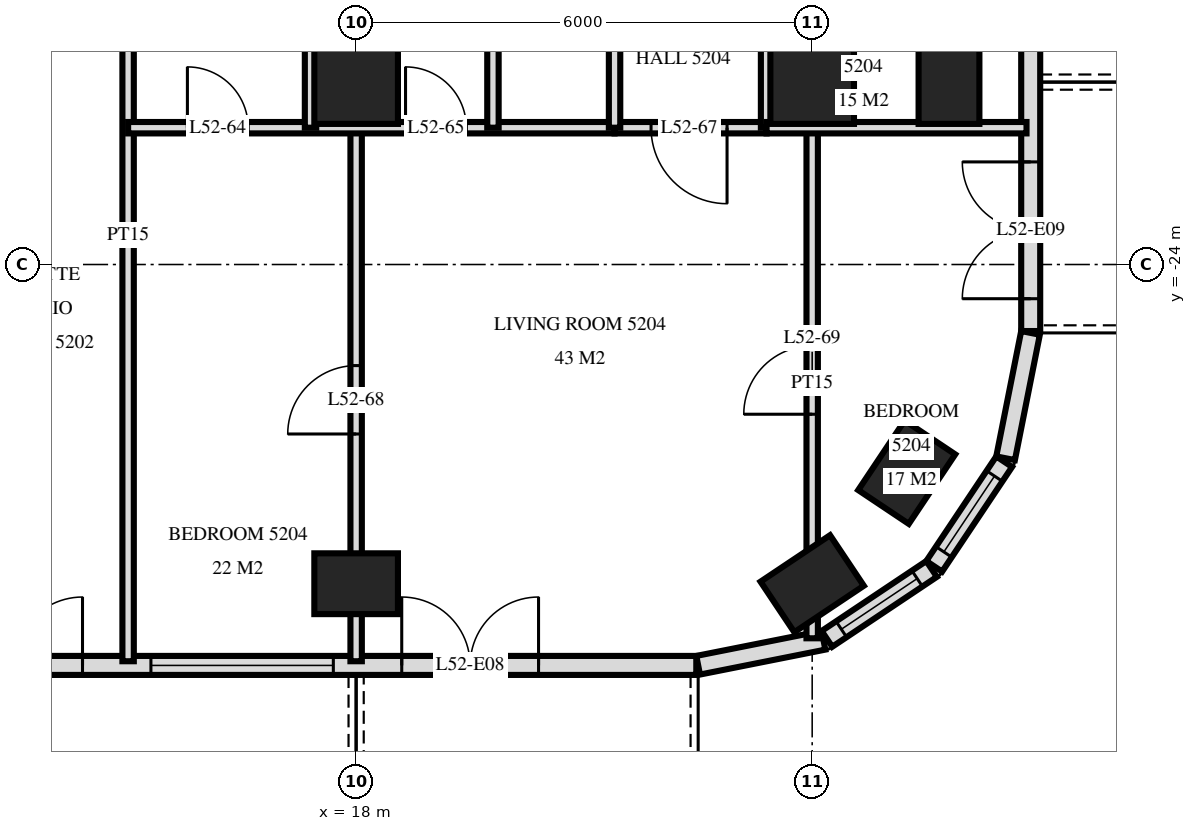
"""IFC4 building model, lengths in metres.
Left out: names, types, materials, properties, quantities, classifications, styles, units other than length and angle.
Written with IfcOpenShell. Run it as: python <this file> out.ifc"""

import sys

from ifc_helpers import new_model, si_unit, direction, frame, frame_2d, origin, origin_2d, place, context, subcontext, project, spatial, rectangle, extrude, element, fill, save


model = new_model("IFC4")
c1 = context("Model", 3, precision=1e-05, world=origin(), true_north=direction((0.0, 1.0)))
c2 = subcontext(c1, "Body", "Model", "MODEL_VIEW")
j1 = project(units=[si_unit("LENGTHUNIT", "METRE"), si_unit("PLANEANGLEUNIT", "RADIAN")], contexts=[c1])
p1 = place(None, origin())
s1 = spatial("IfcSite", under=j1, at=p1, CompositionType="ELEMENT")
p2 = place(p1, origin())
s2 = spatial("IfcBuilding", under=s1, at=p2, CompositionType="ELEMENT")
p3 = place(p2, frame((0.0, 0.0, 201.1)))
s3 = spatial("IfcBuildingStorey", under=s2, at=p3, CompositionType="ELEMENT", Elevation=201.1)
p4 = place(p3, frame((18.0, -28.2, 0.0), z_axis=(0.0, 0.0, 1.0), x_axis=(1.0, 0.0, 0.0)))
e1 = element("IfcColumn", 1, at=p4, inside=s3, PredefinedType="COLUMN", context=c2, shape_type="SweptSolid", body=[
    extrude(rectangle(XDim=1.1, YDim=0.8, at=origin_2d()), origin(), (0.0, 0.0, 1.0), 3.5),
])
p5 = place(p3, frame((18.0, -21.6, 0.0), z_axis=(0.0, 0.0, 1.0), x_axis=(1.0, 0.0, 0.0)))
e2 = element("IfcColumn", 2, at=p5, inside=s3, PredefinedType="COLUMN", context=c2, shape_type="SweptSolid", body=[
    extrude(rectangle(XDim=1.1, YDim=1.1, at=origin_2d()), origin(), (0.0, 0.0, 1.0), 3.5),
])
p6 = place(p3, frame((24.0, -28.2, 0.0), z_axis=(0.0, 0.0, 1.0), x_axis=(0.831459915646, 0.555584744817, 0.0)))
e3 = element("IfcColumn", 3, at=p6, inside=s3, PredefinedType="COLUMN", context=c2, shape_type="SweptSolid", body=[
    extrude(rectangle(XDim=1.1, YDim=0.8, at=origin_2d()), origin(), (0.0, 0.0, 1.0), 3.5),
])
p7 = place(p3, frame((24.0, -21.6, 0.0), z_axis=(0.0, 0.0, 1.0), x_axis=(1.0, 0.0, 0.0)))
e4 = element("IfcColumn", 4, at=p7, inside=s3, PredefinedType="COLUMN", context=c2, shape_type="SweptSolid", body=[
    extrude(rectangle(XDim=1.1, YDim=1.1, at=origin_2d()), origin(), (0.0, 0.0, 1.0), 3.5),
])
for number, where, z_axis, x_axis in (
    (5, (25.244, -26.733, 0.0), (0.0, 0.0, 1.0), (0.556, 0.831, 0.0)),
    (6, (25.8, -21.6, 0.0), (0.0, 0.0, 1.0), (0.0, 1.0, 0.0)),
):
    element("IfcColumn", number, at=place(p3, frame(where, z_axis=z_axis, x_axis=x_axis)), inside=s3, PredefinedType="COLUMN", context=c2, shape_type="SweptSolid", body=[
        extrude(rectangle(XDim=1.1, YDim=0.8, at=origin_2d()), origin(), (0.0, 0.0, 1.0), 3.5),
    ])
p8 = place(p3, frame((-22.475, -29.275, 0.0), z_axis=(0.0, 0.0, 1.0), x_axis=(1.0, 0.0, 0.0)))
e7 = element("IfcWall", 7, at=p8, inside=s3, PredefinedType="SOLIDWALL", context=c2, shape_type="SweptSolid", body=[
    extrude(rectangle(XDim=44.951, YDim=0.25, at=frame_2d((22.475, 0.0))), origin(), (0.0, 0.0, 1.0), 3.22),
])
p9 = place(p8, frame((0.575, 0.0, 0.0)))
e8 = element("IfcOpeningElement", 8, at=p9, cuts=e7, PredefinedType="OPENING", context=c2, shape_type="SweptSolid", body=[
    extrude(rectangle(XDim=1.8, YDim=2.4, at=frame_2d((0.9, 1.2))), frame((0.0, 0.135, 0.0), z_axis=(0.0, -1.0, 0.0), x_axis=(1.0, 0.0, 0.0)), (0.0, 0.0, 1.0), 0.27),
])
p10 = place(p8, frame((4.775, 0.0, 0.9)))
e9 = element("IfcOpeningElement", 9, at=p10, cuts=e7, PredefinedType="OPENING", context=c2, shape_type="SweptSolid", body=[
    extrude(rectangle(XDim=2.4, YDim=1.5, at=frame_2d((1.2, 0.75))), frame((0.0, 0.135, 0.0), z_axis=(0.0, -1.0, 0.0), x_axis=(1.0, 0.0, 0.0)), (0.0, 0.0, 1.0), 0.27),
])
p11 = place(p8, frame((8.075, 0.0, 0.0)))
e10 = element("IfcOpeningElement", 10, at=p11, cuts=e7, PredefinedType="OPENING", context=c2, shape_type="SweptSolid", body=[
    extrude(rectangle(XDim=1.8, YDim=2.4, at=frame_2d((0.9, 1.2))), frame((0.0, 0.135, 0.0), z_axis=(0.0, -1.0, 0.0), x_axis=(1.0, 0.0, 0.0)), (0.0, 0.0, 1.0), 0.27),
])
p12 = place(p8, frame((11.075, 0.0, 0.0)))
e11 = element("IfcOpeningElement", 11, at=p12, cuts=e7, PredefinedType="OPENING", context=c2, shape_type="SweptSolid", body=[
    extrude(rectangle(XDim=1.8, YDim=2.4, at=frame_2d((0.9, 1.2))), frame((0.0, 0.135, 0.0), z_axis=(0.0, -1.0, 0.0), x_axis=(1.0, 0.0, 0.0)), (0.0, 0.0, 1.0), 0.27),
])
p13 = place(p8, frame((13.775, 0.0, 0.9)))
e12 = element("IfcOpeningElement", 12, at=p13, cuts=e7, PredefinedType="OPENING", context=c2, shape_type="SweptSolid", body=[
    extrude(rectangle(XDim=2.4, YDim=1.5, at=frame_2d((1.2, 0.75))), frame((0.0, 0.135, 0.0), z_axis=(0.0, -1.0, 0.0), x_axis=(1.0, 0.0, 0.0)), (0.0, 0.0, 1.0), 0.27),
])
p14 = place(p8, frame((16.775, 0.0, 0.9)))
e13 = element("IfcOpeningElement", 13, at=p14, cuts=e7, PredefinedType="OPENING", context=c2, shape_type="SweptSolid", body=[
    extrude(rectangle(XDim=2.4, YDim=1.5, at=frame_2d((1.2, 0.75))), frame((0.0, 0.135, 0.0), z_axis=(0.0, -1.0, 0.0), x_axis=(1.0, 0.0, 0.0)), (0.0, 0.0, 1.0), 0.27),
])
p15 = place(p8, frame((20.075, 0.0, 0.0)))
e14 = element("IfcOpeningElement", 14, at=p15, cuts=e7, PredefinedType="OPENING", context=c2, shape_type="SweptSolid", body=[
    extrude(rectangle(XDim=1.8, YDim=2.4, at=frame_2d((0.9, 1.2))), frame((0.0, 0.135, 0.0), z_axis=(0.0, -1.0, 0.0), x_axis=(1.0, 0.0, 0.0)), (0.0, 0.0, 1.0), 0.27),
])
p16 = place(p8, frame((23.075, 0.0, 0.0)))
e15 = element("IfcOpeningElement", 15, at=p16, cuts=e7, PredefinedType="OPENING", context=c2, shape_type="SweptSolid", body=[
    extrude(rectangle(XDim=1.8, YDim=2.4, at=frame_2d((0.9, 1.2))), frame((0.0, 0.135, 0.0), z_axis=(0.0, -1.0, 0.0), x_axis=(1.0, 0.0, 0.0)), (0.0, 0.0, 1.0), 0.27),
])
p17 = place(p8, frame((25.775, 0.0, 0.9)))
e16 = element("IfcOpeningElement", 16, at=p17, cuts=e7, PredefinedType="OPENING", context=c2, shape_type="SweptSolid", body=[
    extrude(rectangle(XDim=2.4, YDim=1.5, at=frame_2d((1.2, 0.75))), frame((0.0, 0.135, 0.0), z_axis=(0.0, -1.0, 0.0), x_axis=(1.0, 0.0, 0.0)), (0.0, 0.0, 1.0), 0.27),
])
p18 = place(p8, frame((29.075, 0.0, 0.0)))
e17 = element("IfcOpeningElement", 17, at=p18, cuts=e7, PredefinedType="OPENING", context=c2, shape_type="SweptSolid", body=[
    extrude(rectangle(XDim=1.8, YDim=2.4, at=frame_2d((0.9, 1.2))), frame((0.0, 0.135, 0.0), z_axis=(0.0, -1.0, 0.0), x_axis=(1.0, 0.0, 0.0)), (0.0, 0.0, 1.0), 0.27),
])
p19 = place(p8, frame((31.775, 0.0, 0.9)))
e18 = element("IfcOpeningElement", 18, at=p19, cuts=e7, PredefinedType="OPENING", context=c2, shape_type="SweptSolid", body=[
    extrude(rectangle(XDim=2.4, YDim=1.5, at=frame_2d((1.2, 0.75))), frame((0.0, 0.135, 0.0), z_axis=(0.0, -1.0, 0.0), x_axis=(1.0, 0.0, 0.0)), (0.0, 0.0, 1.0), 0.27),
])
p20 = place(p8, frame((35.075, 0.0, 0.0)))
e19 = element("IfcOpeningElement", 19, at=p20, cuts=e7, PredefinedType="OPENING", context=c2, shape_type="SweptSolid", body=[
    extrude(rectangle(XDim=1.8, YDim=2.4, at=frame_2d((0.9, 1.2))), frame((0.0, 0.135, 0.0), z_axis=(0.0, -1.0, 0.0), x_axis=(1.0, 0.0, 0.0)), (0.0, 0.0, 1.0), 0.27),
])
p21 = place(p8, frame((37.775, 0.0, 0.9)))
e20 = element("IfcOpeningElement", 20, at=p21, cuts=e7, PredefinedType="OPENING", context=c2, shape_type="SweptSolid", body=[
    extrude(rectangle(XDim=2.4, YDim=1.5, at=frame_2d((1.2, 0.75))), frame((0.0, 0.135, 0.0), z_axis=(0.0, -1.0, 0.0), x_axis=(1.0, 0.0, 0.0)), (0.0, 0.0, 1.0), 0.27),
])
p22 = place(p8, frame((41.075, 0.0, 0.0)))
e21 = element("IfcOpeningElement", 21, at=p22, cuts=e7, PredefinedType="OPENING", context=c2, shape_type="SweptSolid", body=[
    extrude(rectangle(XDim=1.8, YDim=2.4, at=frame_2d((0.9, 1.2))), frame((0.0, 0.135, 0.0), z_axis=(0.0, -1.0, 0.0), x_axis=(1.0, 0.0, 0.0)), (0.0, 0.0, 1.0), 0.27),
])
p23 = place(p3, frame((22.5, -29.273, 0.0), z_axis=(0.0, 0.0, 1.0), x_axis=(0.980775640221, 0.19513878023, 0.0)))
e22 = element("IfcWall", 22, at=p23, inside=s3, PredefinedType="SOLIDWALL", context=c2, shape_type="SweptSolid", body=[
    extrude(rectangle(XDim=1.681, YDim=0.25, at=frame_2d((0.841, 0.0))), origin(), (0.0, 0.0, 1.0), 3.22),
])
p24 = place(p3, frame((24.194, -28.926, 0.0), z_axis=(0.0, 0.0, 1.0), x_axis=(0.831482937015, 0.55555029066, 0.0)))
e23 = element("IfcWall", 23, at=p24, inside=s3, PredefinedType="SOLIDWALL", context=c2, shape_type="SweptSolid", body=[
    extrude(rectangle(XDim=1.656, YDim=0.25, at=frame_2d((0.828, 0.0))), origin(), (0.0, 0.0, 1.0), 3.22),
])
p25 = place(p24, frame((0.228, 0.0, 0.9)))
e24 = element("IfcOpeningElement", 24, at=p25, cuts=e23, PredefinedType="OPENING", context=c2, shape_type="SweptSolid", body=[
    extrude(rectangle(XDim=1.2, YDim=1.5, at=frame_2d((0.6, 0.75))), frame((0.0, 0.135, 0.0), z_axis=(0.0, -1.0, 0.0), x_axis=(1.0, 0.0, 0.0)), (0.0, 0.0, 1.0), 0.27),
])
p26 = place(p3, frame((25.606, -27.971, 0.0), z_axis=(0.0, 0.0, 1.0), x_axis=(0.55555029066, 0.831482937015, 0.0)))
e25 = element("IfcWall", 25, at=p26, inside=s3, PredefinedType="SOLIDWALL", context=c2, shape_type="SweptSolid", body=[
    extrude(rectangle(XDim=1.656, YDim=0.25, at=frame_2d((0.828, 0.0))), origin(), (0.0, 0.0, 1.0), 3.22),
])
p27 = place(p26, frame((0.228, 0.0, 0.9)))
e26 = element("IfcOpeningElement", 26, at=p27, cuts=e25, PredefinedType="OPENING", context=c2, shape_type="SweptSolid", body=[
    extrude(rectangle(XDim=1.2, YDim=1.5, at=frame_2d((0.6, 0.75))), frame((0.0, 0.135, 0.0), z_axis=(0.0, -1.0, 0.0), x_axis=(1.0, 0.0, 0.0)), (0.0, 0.0, 1.0), 0.27),
])
p28 = place(p3, frame((26.545, -26.549, 0.0), z_axis=(0.0, 0.0, 1.0), x_axis=(0.195026884138, 0.980797896849, 0.0)))
e27 = element("IfcWall", 27, at=p28, inside=s3, PredefinedType="SOLIDWALL", context=c2, shape_type="SweptSolid", body=[
    extrude(rectangle(XDim=1.681, YDim=0.25, at=frame_2d((0.841, 0.0))), origin(), (0.0, 0.0, 1.0), 3.22),
])
p29 = place(p3, frame((26.875, -24.875, 0.0), z_axis=(0.0, 0.0, 1.0), x_axis=(0.0, 1.0, 0.0)))
e28 = element("IfcWall", 28, at=p29, inside=s3, PredefinedType="SOLIDWALL", context=c2, shape_type="SweptSolid", body=[
    extrude(rectangle(XDim=21.551, YDim=0.25, at=frame_2d((10.775, 0.0))), origin(), (0.0, 0.0, 1.0), 3.22),
])
p30 = place(p29, frame((0.425, 0.0, 0.0)))
e29 = element("IfcOpeningElement", 29, at=p30, cuts=e28, PredefinedType="OPENING", context=c2, shape_type="SweptSolid", body=[
    extrude(rectangle(XDim=1.8, YDim=2.4, at=frame_2d((0.9, 1.2))), frame((0.0, 0.135, 0.0), z_axis=(0.0, -1.0, 0.0), x_axis=(1.0, 0.0, 0.0)), (0.0, 0.0, 1.0), 0.27),
])
p31 = place(p29, frame((3.875, 0.0, 0.0)))
e30 = element("IfcOpeningElement", 30, at=p31, cuts=e28, PredefinedType="OPENING", context=c2, shape_type="SweptSolid", body=[
    extrude(rectangle(XDim=1.8, YDim=2.4, at=frame_2d((0.9, 1.2))), frame((0.0, 0.135, 0.0), z_axis=(0.0, -1.0, 0.0), x_axis=(1.0, 0.0, 0.0)), (0.0, 0.0, 1.0), 0.27),
])
p32 = place(p29, frame((7.775, 0.0, 0.9)))
e31 = element("IfcOpeningElement", 31, at=p32, cuts=e28, PredefinedType="OPENING", context=c2, shape_type="SweptSolid", body=[
    extrude(rectangle(XDim=1.2, YDim=1.5, at=frame_2d((0.6, 0.75))), frame((0.0, 0.135, 0.0), z_axis=(0.0, -1.0, 0.0), x_axis=(1.0, 0.0, 0.0)), (0.0, 0.0, 1.0), 0.27),
])
p33 = place(p29, frame((11.975, 0.0, 0.0)))
e32 = element("IfcOpeningElement", 32, at=p33, cuts=e28, PredefinedType="OPENING", context=c2, shape_type="SweptSolid", body=[
    extrude(rectangle(XDim=1.8, YDim=2.4, at=frame_2d((0.9, 1.2))), frame((0.0, 0.135, 0.0), z_axis=(0.0, -1.0, 0.0), x_axis=(1.0, 0.0, 0.0)), (0.0, 0.0, 1.0), 0.27),
])
p34 = place(p3, frame((24.0, -28.918, 0.0), z_axis=(0.0, 0.0, 1.0), x_axis=(0.0, 1.0, 0.0)))
e33 = element("IfcWall", 33, at=p34, inside=s3, PredefinedType="PARTITIONING", context=c2, shape_type="SweptSolid", body=[
    extrude(rectangle(XDim=6.718, YDim=0.15, at=frame_2d((3.359, 0.0))), origin(), (0.0, 0.0, 1.0), 3.22),
])
p35 = place(p34, frame((2.948, 0.0, 0.0)))
e34 = element("IfcOpeningElement", 34, at=p35, cuts=e33, PredefinedType="OPENING", context=c2, shape_type="SweptSolid", body=[
    extrude(rectangle(XDim=0.9, YDim=2.1, at=frame_2d((0.45, 1.05))), frame((0.0, 0.085, 0.0), z_axis=(0.0, -1.0, 0.0), x_axis=(1.0, 0.0, 0.0)), (0.0, 0.0, 1.0), 0.17),
])
p36 = place(p3, frame((23.4, -22.2, 0.0), z_axis=(0.0, 0.0, 1.0), x_axis=(0.0, 1.0, 0.0)))
e35 = element("IfcWall", 35, at=p36, inside=s3, PredefinedType="PARTITIONING", context=c2, shape_type="SweptSolid", body=[
    extrude(rectangle(XDim=4.2, YDim=0.15, at=frame_2d((2.1, 0.0))), origin(), (0.0, 0.0, 1.0), 3.22),
])
p37 = place(p36, frame((1.62, 0.0, 0.0)))
e36 = element("IfcOpeningElement", 36, at=p37, cuts=e35, PredefinedType="OPENING", context=c2, shape_type="SweptSolid", body=[
    extrude(rectangle(XDim=1.0, YDim=2.1, at=frame_2d((0.5, 1.05))), frame((0.0, 0.085, 0.0), z_axis=(0.0, -1.0, 0.0), x_axis=(1.0, 0.0, 0.0)), (0.0, 0.0, 1.0), 0.17),
])
for number, where, z_axis, x_axis in (
    (37, (21.4, -22.2, 0.0), (0.0, 0.0, 1.0), (0.0, 1.0, 0.0)),
    (38, (19.8, -22.2, 0.0), (0.0, 0.0, 1.0), (0.0, 1.0, 0.0)),
):
    element("IfcWall", number, at=place(p3, frame(where, z_axis=z_axis, x_axis=x_axis)), inside=s3, PredefinedType="PARTITIONING", context=c2, shape_type="SweptSolid", body=[
        extrude(rectangle(XDim=4.2, YDim=0.15, at=frame_2d((2.1, 0.0))), origin(), (0.0, 0.0, 1.0), 3.22),
    ])
p38 = place(p3, frame((18.0, -29.22, 0.0), z_axis=(0.0, 0.0, 1.0), x_axis=(0.0, 1.0, 0.0)))
e39 = element("IfcWall", 39, at=p38, inside=s3, PredefinedType="PARTITIONING", context=c2, shape_type="SweptSolid", body=[
    extrude(rectangle(XDim=7.02, YDim=0.15, at=frame_2d((3.51, 0.0))), origin(), (0.0, 0.0, 1.0), 3.22),
])
p39 = place(p38, frame((2.99, 0.0, 0.0)))
e40 = element("IfcOpeningElement", 40, at=p39, cuts=e39, PredefinedType="OPENING", context=c2, shape_type="SweptSolid", body=[
    extrude(rectangle(XDim=0.9, YDim=2.1, at=frame_2d((0.45, 1.05))), frame((0.0, 0.085, 0.0), z_axis=(0.0, -1.0, 0.0), x_axis=(1.0, 0.0, 0.0)), (0.0, 0.0, 1.0), 0.17),
])
p40 = place(p3, frame((17.4, -22.2, 0.0), z_axis=(0.0, 0.0, 1.0), x_axis=(0.0, 1.0, 0.0)))
e41 = element("IfcWall", 41, at=p40, inside=s3, PredefinedType="PARTITIONING", context=c2, shape_type="SweptSolid", body=[
    extrude(rectangle(XDim=4.2, YDim=0.15, at=frame_2d((2.1, 0.0))), origin(), (0.0, 0.0, 1.0), 3.22),
])
p41 = place(p3, frame((15.0, -29.22, 0.0), z_axis=(0.0, 0.0, 1.0), x_axis=(0.0, 1.0, 0.0)))
e42 = element("IfcWall", 42, at=p41, inside=s3, PredefinedType="PARTITIONING", context=c2, shape_type="SweptSolid", body=[
    extrude(rectangle(XDim=11.22, YDim=0.15, at=frame_2d((5.61, 0.0))), origin(), (0.0, 0.0, 1.0), 3.22),
])
p42 = place(p3, frame((21.4, -22.2, 0.0), z_axis=(0.0, 0.0, 1.0), x_axis=(1.0, 0.0, 0.0)))
e43 = element("IfcWall", 43, at=p42, inside=s3, PredefinedType="PARTITIONING", context=c2, shape_type="SweptSolid", body=[
    extrude(rectangle(XDim=2.0, YDim=0.15, at=frame_2d((1.0, 0.0))), origin(), (0.0, 0.0, 1.0), 3.22),
])
p43 = place(p42, frame((0.48, 0.0, 0.0)))
e44 = element("IfcOpeningElement", 44, at=p43, cuts=e43, PredefinedType="OPENING", context=c2, shape_type="SweptSolid", body=[
    extrude(rectangle(XDim=1.0, YDim=2.1, at=frame_2d((0.5, 1.05))), frame((0.0, 0.085, 0.0), z_axis=(0.0, -1.0, 0.0), x_axis=(1.0, 0.0, 0.0)), (0.0, 0.0, 1.0), 0.17),
])
p44 = place(p3, frame((15.0, -22.2, 0.0), z_axis=(0.0, 0.0, 1.0), x_axis=(1.0, 0.0, 0.0)))
e45 = element("IfcWall", 45, at=p44, inside=s3, PredefinedType="PARTITIONING", context=c2, shape_type="SweptSolid", body=[
    extrude(rectangle(XDim=6.4, YDim=0.15, at=frame_2d((3.2, 0.0))), origin(), (0.0, 0.0, 1.0), 3.22),
])
p45 = place(p44, frame((0.78, 0.0, 0.0)))
e46 = element("IfcOpeningElement", 46, at=p45, cuts=e45, PredefinedType="OPENING", context=c2, shape_type="SweptSolid", body=[
    extrude(rectangle(XDim=0.8, YDim=2.1, at=frame_2d((0.4, 1.05))), frame((0.0, 0.085, 0.0), z_axis=(0.0, -1.0, 0.0), x_axis=(1.0, 0.0, 0.0)), (0.0, 0.0, 1.0), 0.17),
])
p46 = place(p44, frame((3.65, 0.0, 0.0)))
e47 = element("IfcOpeningElement", 47, at=p46, cuts=e45, PredefinedType="OPENING", context=c2, shape_type="SweptSolid", body=[
    extrude(rectangle(XDim=0.8, YDim=2.1, at=frame_2d((0.4, 1.05))), frame((0.0, 0.085, 0.0), z_axis=(0.0, -1.0, 0.0), x_axis=(1.0, 0.0, 0.0)), (0.0, 0.0, 1.0), 0.17),
])
p47 = place(p3, frame((23.4, -22.2, 0.0), z_axis=(0.0, 0.0, 1.0), x_axis=(1.0, 0.0, 0.0)))
e48 = element("IfcWall", 48, at=p47, inside=s3, PredefinedType="PARTITIONING", context=c2, shape_type="SweptSolid", body=[
    extrude(rectangle(XDim=3.42, YDim=0.15, at=frame_2d((1.71, 0.0))), origin(), (0.0, 0.0, 1.0), 3.22),
])
p48 = place(p25, origin())
e49 = element("IfcWindow", 49, at=p48, inside=s3, PartitioningType="SINGLE_PANEL", PredefinedType="WINDOW", context=c2, shape_type="SweptSolid", body=[
    extrude(rectangle(XDim=1.2, YDim=1.5, at=frame_2d((0.6, 0.75))), frame((0.0, 0.03, 0.0), z_axis=(0.0, -1.0, 0.0), x_axis=(1.0, 0.0, 0.0)), (0.0, 0.0, 1.0), 0.06),
])
fill(e24, e49)
p49 = place(p27, origin())
e50 = element("IfcWindow", 50, at=p49, inside=s3, PartitioningType="SINGLE_PANEL", PredefinedType="WINDOW", context=c2, shape_type="SweptSolid", body=[
    extrude(rectangle(XDim=1.2, YDim=1.5, at=frame_2d((0.6, 0.75))), frame((0.0, 0.03, 0.0), z_axis=(0.0, -1.0, 0.0), x_axis=(1.0, 0.0, 0.0)), (0.0, 0.0, 1.0), 0.06),
])
fill(e26, e50)
p50 = place(p20, origin())
e51 = element("IfcDoor", 51, at=p50, inside=s3, OperationType="DOUBLE_DOOR_SINGLE_SWING", PredefinedType="DOOR", context=c2, shape_type="SweptSolid", body=[
    extrude(rectangle(XDim=1.8, YDim=2.4, at=frame_2d((0.9, 1.2))), frame((0.0, 0.025, 0.0), z_axis=(0.0, -1.0, 0.0), x_axis=(1.0, 0.0, 0.0)), (0.0, 0.0, 1.0), 0.05),
])
fill(e19, e51)
p51 = place(p21, origin())
e52 = element("IfcWindow", 52, at=p51, inside=s3, PartitioningType="SINGLE_PANEL", PredefinedType="WINDOW", context=c2, shape_type="SweptSolid", body=[
    extrude(rectangle(XDim=2.4, YDim=1.5, at=frame_2d((1.2, 0.75))), frame((0.0, 0.03, 0.0), z_axis=(0.0, -1.0, 0.0), x_axis=(1.0, 0.0, 0.0)), (0.0, 0.0, 1.0), 0.06),
])
fill(e20, e52)
p52 = place(p22, origin())
e53 = element("IfcDoor", 53, at=p52, inside=s3, OperationType="DOUBLE_DOOR_SINGLE_SWING", PredefinedType="DOOR", context=c2, shape_type="SweptSolid", body=[
    extrude(rectangle(XDim=1.8, YDim=2.4, at=frame_2d((0.9, 1.2))), frame((0.0, 0.025, 0.0), z_axis=(0.0, -1.0, 0.0), x_axis=(1.0, 0.0, 0.0)), (0.0, 0.0, 1.0), 0.05),
])
fill(e21, e53)
p53 = place(p30, origin())
e54 = element("IfcDoor", 54, at=p53, inside=s3, OperationType="DOUBLE_DOOR_SINGLE_SWING", PredefinedType="DOOR", context=c2, shape_type="SweptSolid", body=[
    extrude(rectangle(XDim=1.8, YDim=2.4, at=frame_2d((0.9, 1.2))), frame((0.0, 0.025, 0.0), z_axis=(0.0, -1.0, 0.0), x_axis=(1.0, 0.0, 0.0)), (0.0, 0.0, 1.0), 0.05),
])
fill(e29, e54)
p54 = place(p45, origin())
e55 = element("IfcDoor", 55, at=p54, inside=s3, OperationType="SINGLE_SWING_RIGHT", PredefinedType="DOOR", context=c2, shape_type="SweptSolid", body=[
    extrude(rectangle(XDim=0.8, YDim=2.1, at=frame_2d((0.4, 1.05))), frame((0.0, 0.025, 0.0), z_axis=(0.0, -1.0, 0.0), x_axis=(1.0, 0.0, 0.0)), (0.0, 0.0, 1.0), 0.05),
])
fill(e46, e55)
p55 = place(p46, origin())
e56 = element("IfcDoor", 56, at=p55, inside=s3, OperationType="SINGLE_SWING_RIGHT", PredefinedType="DOOR", context=c2, shape_type="SweptSolid", body=[
    extrude(rectangle(XDim=0.8, YDim=2.1, at=frame_2d((0.4, 1.05))), frame((0.0, 0.025, 0.0), z_axis=(0.0, -1.0, 0.0), x_axis=(1.0, 0.0, 0.0)), (0.0, 0.0, 1.0), 0.05),
])
fill(e47, e56)
p56 = place(p43, frame((0.5, 0.0, 0.0), z_axis=(0.0, 0.0, 1.0), x_axis=(-1.0, 0.0, 0.0)))
e57 = element("IfcDoor", 57, at=p56, inside=s3, OperationType="SINGLE_SWING_RIGHT", PredefinedType="DOOR", context=c2, shape_type="SweptSolid", body=[
    extrude(rectangle(XDim=1.0, YDim=2.1, at=frame_2d((0.0, 1.05))), frame((0.0, -0.025, 0.0), z_axis=(0.0, 1.0, 0.0), x_axis=(-1.0, 0.0, 0.0)), (0.0, 0.0, 1.0), 0.05),
])
fill(e44, e57)
p57 = place(p39, origin())
e58 = element("IfcDoor", 58, at=p57, inside=s3, OperationType="SINGLE_SWING_RIGHT", PredefinedType="DOOR", context=c2, shape_type="SweptSolid", body=[
    extrude(rectangle(XDim=0.9, YDim=2.1, at=frame_2d((0.45, 1.05))), frame((0.0, 0.025, 0.0), z_axis=(0.0, -1.0, 0.0), x_axis=(1.0, 0.0, 0.0)), (0.0, 0.0, 1.0), 0.05),
])
fill(e40, e58)
p58 = place(p35, origin())
e59 = element("IfcDoor", 59, at=p58, inside=s3, OperationType="SINGLE_SWING_RIGHT", PredefinedType="DOOR", context=c2, shape_type="SweptSolid", body=[
    extrude(rectangle(XDim=0.9, YDim=2.1, at=frame_2d((0.45, 1.05))), frame((0.0, 0.025, 0.0), z_axis=(0.0, -1.0, 0.0), x_axis=(1.0, 0.0, 0.0)), (0.0, 0.0, 1.0), 0.05),
])
fill(e34, e59)
save(model, sys.argv[1])
